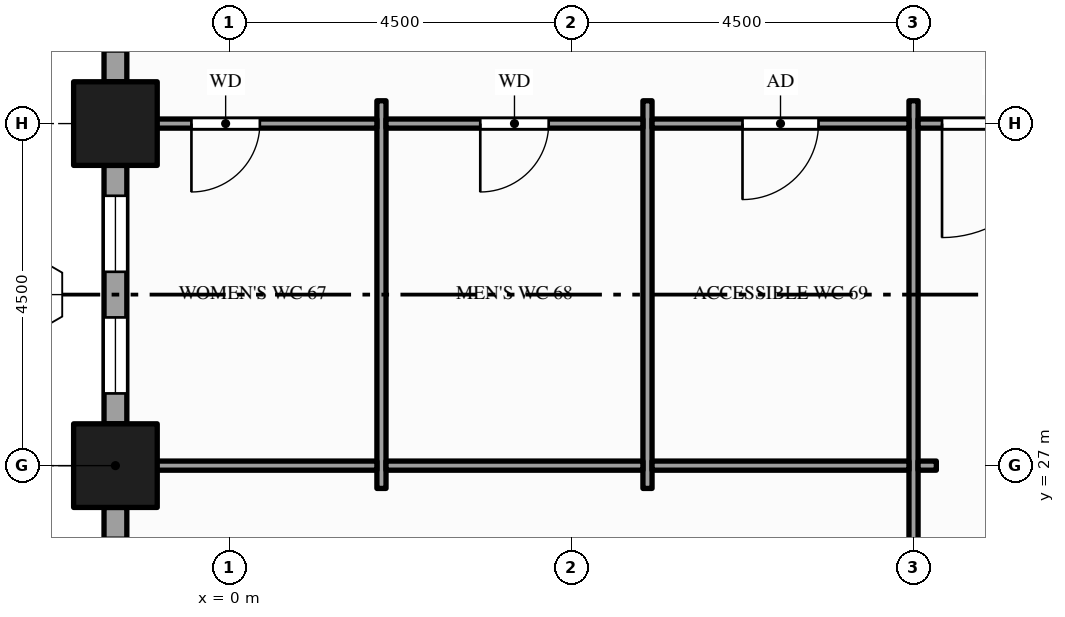
"""IFC4 building model, lengths in metres.
Left out: names, types, materials, properties, quantities, classifications, styles, units other than length and angle.
Written with IfcOpenShell. Run it as: python <this file> out.ifc"""

import sys

from ifc_helpers import new_model, si_unit, direction, frame, frame_2d, origin, origin_2d, place, context, subcontext, project, spatial, rectangle, hollow_rectangle, extrude, element, fill, save


model = new_model("IFC4")
c1 = context("Model", 3, precision=1e-05, world=origin(), true_north=direction((0.0, 1.0)))
c2 = subcontext(c1, "Body", "Model", "MODEL_VIEW")
j1 = project(units=[si_unit("LENGTHUNIT", "METRE"), si_unit("PLANEANGLEUNIT", "RADIAN")], contexts=[c1])
p1 = place(None, origin())
s1 = spatial("IfcSite", under=j1, at=p1, CompositionType="ELEMENT")
p2 = place(p1, origin())
s2 = spatial("IfcBuilding", under=s1, at=p2, CompositionType="ELEMENT")
p3 = place(p2, frame((0.0, 0.0, 73.0)))
s3 = spatial("IfcBuildingStorey", under=s2, at=p3, CompositionType="ELEMENT", Elevation=73.0)
for number, where, z_axis, x_axis in (
    (1, (-1.5, 27.0, -0.15), (0.0, 0.0, 1.0), (1.0, 0.0, 0.0)),
    (2, (-1.5, 31.5, -0.15), (0.0, 0.0, 1.0), (1.0, 0.0, 0.0)),
):
    element("IfcColumn", number, at=place(p3, frame(where, z_axis=z_axis, x_axis=x_axis)), inside=s3, PredefinedType="COLUMN", context=c2, shape_type="SweptSolid", body=[
        extrude(hollow_rectangle(XDim=1.1, YDim=1.1, WallThickness=0.06, at=origin_2d()), origin(), (0.0, 0.0, 1.0), 3.9),
    ])
p4 = place(p3, frame((-1.5, 35.45, 0.0), z_axis=(0.0, 0.0, 1.0), x_axis=(0.0, -1.0, 0.0)))
e3 = element("IfcWall", 3, at=p4, inside=s3, PredefinedType="STANDARD", context=c2, shape_type="SweptSolid", body=[
    extrude(rectangle(XDim=3.4, YDim=0.3, at=frame_2d((1.7, 0.0))), origin(), (0.0, 0.0, 1.0), 3.044),
])
p5 = place(p4, frame((0.4, 0.0, 0.9)))
e4 = element("IfcOpeningElement", 4, at=p5, cuts=e3, PredefinedType="OPENING", context=c2, shape_type="SweptSolid", body=[
    extrude(rectangle(XDim=1.0, YDim=2.0, at=frame_2d((0.5, 1.0))), frame((0.0, 0.16, 0.0), z_axis=(0.0, -1.0, 0.0), x_axis=(1.0, 0.0, 0.0)), (0.0, 0.0, 1.0), 0.32),
])
p6 = place(p4, frame((2.0, 0.0, 0.9)))
e5 = element("IfcOpeningElement", 5, at=p6, cuts=e3, PredefinedType="OPENING", context=c2, shape_type="SweptSolid", body=[
    extrude(rectangle(XDim=1.0, YDim=2.0, at=frame_2d((0.5, 1.0))), frame((0.0, 0.16, 0.0), z_axis=(0.0, -1.0, 0.0), x_axis=(1.0, 0.0, 0.0)), (0.0, 0.0, 1.0), 0.32),
])
p7 = place(p3, frame((-1.5, 30.95, 0.0), z_axis=(0.0, 0.0, 1.0), x_axis=(0.0, -1.0, 0.0)))
e6 = element("IfcWall", 6, at=p7, inside=s3, PredefinedType="STANDARD", context=c2, shape_type="SweptSolid", body=[
    extrude(rectangle(XDim=3.4, YDim=0.3, at=frame_2d((1.7, 0.0))), origin(), (0.0, 0.0, 1.0), 3.044),
])
p8 = place(p7, frame((0.4, 0.0, 0.9)))
e7 = element("IfcOpeningElement", 7, at=p8, cuts=e6, PredefinedType="OPENING", context=c2, shape_type="SweptSolid", body=[
    extrude(rectangle(XDim=1.0, YDim=2.0, at=frame_2d((0.5, 1.0))), frame((0.0, 0.16, 0.0), z_axis=(0.0, -1.0, 0.0), x_axis=(1.0, 0.0, 0.0)), (0.0, 0.0, 1.0), 0.32),
])
p9 = place(p7, frame((2.0, 0.0, 0.9)))
e8 = element("IfcOpeningElement", 8, at=p9, cuts=e6, PredefinedType="OPENING", context=c2, shape_type="SweptSolid", body=[
    extrude(rectangle(XDim=1.0, YDim=2.0, at=frame_2d((0.5, 1.0))), frame((0.0, 0.16, 0.0), z_axis=(0.0, -1.0, 0.0), x_axis=(1.0, 0.0, 0.0)), (0.0, 0.0, 1.0), 0.32),
])
p10 = place(p3, frame((-1.5, 26.45, 0.0), z_axis=(0.0, 0.0, 1.0), x_axis=(0.0, -1.0, 0.0)))
e9 = element("IfcWall", 9, at=p10, inside=s3, PredefinedType="STANDARD", context=c2, shape_type="SweptSolid", body=[
    extrude(rectangle(XDim=3.4, YDim=0.3, at=frame_2d((1.7, 0.0))), origin(), (0.0, 0.0, 1.0), 3.044),
])
p11 = place(p10, frame((0.4, 0.0, 0.9)))
e10 = element("IfcOpeningElement", 10, at=p11, cuts=e9, PredefinedType="OPENING", context=c2, shape_type="SweptSolid", body=[
    extrude(rectangle(XDim=1.0, YDim=2.0, at=frame_2d((0.5, 1.0))), frame((0.0, 0.16, 0.0), z_axis=(0.0, -1.0, 0.0), x_axis=(1.0, 0.0, 0.0)), (0.0, 0.0, 1.0), 0.32),
])
p12 = place(p10, frame((2.0, 0.0, 0.9)))
e11 = element("IfcOpeningElement", 11, at=p12, cuts=e9, PredefinedType="OPENING", context=c2, shape_type="SweptSolid", body=[
    extrude(rectangle(XDim=1.0, YDim=2.0, at=frame_2d((0.5, 1.0))), frame((0.0, 0.16, 0.0), z_axis=(0.0, -1.0, 0.0), x_axis=(1.0, 0.0, 0.0)), (0.0, 0.0, 1.0), 0.32),
])
for number, where, z_axis, x_axis in (
    (12, (2.0, 26.7, 0.0), (0.0, 0.0, 1.0), (0.0, 1.0, 0.0)),
    (13, (5.5, 26.7, 0.0), (0.0, 0.0, 1.0), (0.0, 1.0, 0.0)),
):
    element("IfcWall", number, at=place(p3, frame(where, z_axis=z_axis, x_axis=x_axis)), inside=s3, PredefinedType="PARTITIONING", context=c2, shape_type="SweptSolid", body=[
        extrude(rectangle(XDim=5.1, YDim=0.12, at=frame_2d((2.55, 0.0))), origin(), (0.0, 0.0, 1.0), 3.75),
    ])
p13 = place(p3, frame((9.0, 10.95, 0.0), z_axis=(0.0, 0.0, 1.0), x_axis=(0.0, 1.0, 0.0)))
e14 = element("IfcWall", 14, at=p13, inside=s3, PredefinedType="PARTITIONING", context=c2, shape_type="SweptSolid", body=[
    extrude(rectangle(XDim=20.85, YDim=0.12, at=frame_2d((10.425, 0.0))), origin(), (0.0, 0.0, 1.0), 2.5),
])
p14 = place(p13, frame((3.9, 0.0, 0.0)))
e15 = element("IfcOpeningElement", 15, at=p14, cuts=e14, PredefinedType="OPENING", context=c2, shape_type="SweptSolid", body=[
    extrude(rectangle(XDim=1.8, YDim=2.1, at=frame_2d((0.9, 1.05))), frame((0.0, 0.07, 0.0), z_axis=(0.0, -1.0, 0.0), x_axis=(1.0, 0.0, 0.0)), (0.0, 0.0, 1.0), 0.14),
])
p15 = place(p13, frame((12.205, 0.0, 0.0)))
e16 = element("IfcOpeningElement", 16, at=p15, cuts=e14, PredefinedType="OPENING", context=c2, shape_type="SweptSolid", body=[
    extrude(rectangle(XDim=1.0, YDim=2.1, at=frame_2d((0.5, 1.05))), frame((0.0, 0.07, 0.0), z_axis=(0.0, -1.0, 0.0), x_axis=(1.0, 0.0, 0.0)), (0.0, 0.0, 1.0), 0.14),
])
p16 = place(p3, frame((-1.35, 27.0, 0.0), z_axis=(0.0, 0.0, 1.0), x_axis=(1.0, 0.0, 0.0)))
e17 = element("IfcWall", 17, at=p16, inside=s3, PredefinedType="PARTITIONING", context=c2, shape_type="SweptSolid", body=[
    extrude(rectangle(XDim=3.29, YDim=0.12, at=frame_2d((1.645, 0.0))), origin(), (0.0, 0.0, 1.0), 2.35),
])
for number, where, z_axis, x_axis in (
    (18, (2.06, 27.0, 0.0), (0.0, 0.0, 1.0), (1.0, 0.0, 0.0)),
    (19, (5.56, 27.0, 0.0), (0.0, 0.0, 1.0), (1.0, 0.0, 0.0)),
):
    element("IfcWall", number, at=place(p3, frame(where, z_axis=z_axis, x_axis=x_axis)), inside=s3, PredefinedType="PARTITIONING", context=c2, shape_type="SweptSolid", body=[
        extrude(rectangle(XDim=3.38, YDim=0.12, at=frame_2d((1.69, 0.0))), origin(), (0.0, 0.0, 1.0), 2.838),
    ])
p17 = place(p3, frame((9.06, 27.0, 0.0), z_axis=(0.0, 0.0, 1.0), x_axis=(1.0, 0.0, 0.0)))
e20 = element("IfcWall", 20, at=p17, inside=s3, PredefinedType="PARTITIONING", context=c2, shape_type="SweptSolid", body=[
    extrude(rectangle(XDim=0.24, YDim=0.12, at=frame_2d((0.12, 0.0))), origin(), (0.0, 0.0, 1.0), 2.838),
])
p18 = place(p3, frame((-1.35, 31.5, 0.0), z_axis=(0.0, 0.0, 1.0), x_axis=(1.0, 0.0, 0.0)))
e21 = element("IfcWall", 21, at=p18, inside=s3, PredefinedType="PARTITIONING", context=c2, shape_type="SweptSolid", body=[
    extrude(rectangle(XDim=3.29, YDim=0.12, at=frame_2d((1.645, 0.0))), origin(), (0.0, 0.0, 1.0), 2.35),
])
p19 = place(p18, frame((0.85, 0.0, 0.0)))
e22 = element("IfcOpeningElement", 22, at=p19, cuts=e21, PredefinedType="OPENING", context=c2, shape_type="SweptSolid", body=[
    extrude(rectangle(XDim=0.9, YDim=2.1, at=frame_2d((0.45, 1.05))), frame((0.0, 0.07, 0.0), z_axis=(0.0, -1.0, 0.0), x_axis=(1.0, 0.0, 0.0)), (0.0, 0.0, 1.0), 0.14),
])
p20 = place(p3, frame((2.06, 31.5, 0.0), z_axis=(0.0, 0.0, 1.0), x_axis=(1.0, 0.0, 0.0)))
e23 = element("IfcWall", 23, at=p20, inside=s3, PredefinedType="PARTITIONING", context=c2, shape_type="SweptSolid", body=[
    extrude(rectangle(XDim=3.38, YDim=0.12, at=frame_2d((1.69, 0.0))), origin(), (0.0, 0.0, 1.0), 2.838),
])
p21 = place(p20, frame((1.24, 0.0, 0.0)))
e24 = element("IfcOpeningElement", 24, at=p21, cuts=e23, PredefinedType="OPENING", context=c2, shape_type="SweptSolid", body=[
    extrude(rectangle(XDim=0.9, YDim=2.1, at=frame_2d((0.45, 1.05))), frame((0.0, 0.07, 0.0), z_axis=(0.0, -1.0, 0.0), x_axis=(1.0, 0.0, 0.0)), (0.0, 0.0, 1.0), 0.14),
])
p22 = place(p3, frame((5.56, 31.5, 0.0), z_axis=(0.0, 0.0, 1.0), x_axis=(1.0, 0.0, 0.0)))
e25 = element("IfcWall", 25, at=p22, inside=s3, PredefinedType="PARTITIONING", context=c2, shape_type="SweptSolid", body=[
    extrude(rectangle(XDim=3.38, YDim=0.12, at=frame_2d((1.69, 0.0))), origin(), (0.0, 0.0, 1.0), 2.838),
])
p23 = place(p22, frame((1.19, 0.0, 0.0)))
e26 = element("IfcOpeningElement", 26, at=p23, cuts=e25, PredefinedType="OPENING", context=c2, shape_type="SweptSolid", body=[
    extrude(rectangle(XDim=1.0, YDim=2.1, at=frame_2d((0.5, 1.05))), frame((0.0, 0.07, 0.0), z_axis=(0.0, -1.0, 0.0), x_axis=(1.0, 0.0, 0.0)), (0.0, 0.0, 1.0), 0.14),
])
p24 = place(p3, frame((9.06, 31.5, 0.0), z_axis=(0.0, 0.0, 1.0), x_axis=(1.0, 0.0, 0.0)))
e27 = element("IfcWall", 27, at=p24, inside=s3, PredefinedType="PARTITIONING", context=c2, shape_type="SweptSolid", body=[
    extrude(rectangle(XDim=2.13, YDim=0.12, at=frame_2d((1.065, 0.0))), origin(), (0.0, 0.0, 1.0), 2.838),
])
p25 = place(p24, frame((0.315, 0.0, 0.0)))
e28 = element("IfcOpeningElement", 28, at=p25, cuts=e27, PredefinedType="OPENING", context=c2, shape_type="SweptSolid", body=[
    extrude(rectangle(XDim=1.5, YDim=2.1, at=frame_2d((0.75, 1.05))), frame((0.0, 0.07, 0.0), z_axis=(0.0, -1.0, 0.0), x_axis=(1.0, 0.0, 0.0)), (0.0, 0.0, 1.0), 0.14),
])
p26 = place(p8, origin())
e29 = element("IfcWindow", 29, at=p26, inside=s3, PartitioningType="SINGLE_PANEL", PredefinedType="WINDOW", context=c2, shape_type="SweptSolid", body=[
    extrude(rectangle(XDim=1.0, YDim=2.0, at=frame_2d((0.5, 1.0))), frame((0.0, 0.03, 0.0), z_axis=(0.0, -1.0, 0.0), x_axis=(1.0, 0.0, 0.0)), (0.0, 0.0, 1.0), 0.06),
])
fill(e7, e29)
p27 = place(p9, origin())
e30 = element("IfcWindow", 30, at=p27, inside=s3, PartitioningType="SINGLE_PANEL", PredefinedType="WINDOW", context=c2, shape_type="SweptSolid", body=[
    extrude(rectangle(XDim=1.0, YDim=2.0, at=frame_2d((0.5, 1.0))), frame((0.0, 0.03, 0.0), z_axis=(0.0, -1.0, 0.0), x_axis=(1.0, 0.0, 0.0)), (0.0, 0.0, 1.0), 0.06),
])
fill(e8, e30)
p28 = place(p25, origin())
e31 = element("IfcDoor", 31, at=p28, inside=s3, OperationType="SINGLE_SWING_LEFT", PredefinedType="DOOR", context=c2, shape_type="SweptSolid", body=[
    extrude(rectangle(XDim=1.5, YDim=2.1, at=frame_2d((0.75, 1.05))), frame((0.0, 0.025, 0.0), z_axis=(0.0, -1.0, 0.0), x_axis=(1.0, 0.0, 0.0)), (0.0, 0.0, 1.0), 0.05),
])
fill(e28, e31)
p29 = place(p19, origin())
e32 = element("IfcDoor", 32, at=p29, inside=s3, OperationType="SINGLE_SWING_LEFT", PredefinedType="DOOR", context=c2, shape_type="SweptSolid", body=[
    extrude(rectangle(XDim=0.9, YDim=2.1, at=frame_2d((0.45, 1.05))), frame((0.0, 0.025, 0.0), z_axis=(0.0, -1.0, 0.0), x_axis=(1.0, 0.0, 0.0)), (0.0, 0.0, 1.0), 0.05),
])
fill(e22, e32)
p30 = place(p21, origin())
e33 = element("IfcDoor", 33, at=p30, inside=s3, OperationType="SINGLE_SWING_LEFT", PredefinedType="DOOR", context=c2, shape_type="SweptSolid", body=[
    extrude(rectangle(XDim=0.9, YDim=2.1, at=frame_2d((0.45, 1.05))), frame((0.0, 0.025, 0.0), z_axis=(0.0, -1.0, 0.0), x_axis=(1.0, 0.0, 0.0)), (0.0, 0.0, 1.0), 0.05),
])
fill(e24, e33)
p31 = place(p23, origin())
e34 = element("IfcDoor", 34, at=p31, inside=s3, OperationType="SINGLE_SWING_LEFT", PredefinedType="DOOR", context=c2, shape_type="SweptSolid", body=[
    extrude(rectangle(XDim=1.0, YDim=2.1, at=frame_2d((0.5, 1.05))), frame((0.0, 0.025, 0.0), z_axis=(0.0, -1.0, 0.0), x_axis=(1.0, 0.0, 0.0)), (0.0, 0.0, 1.0), 0.05),
])
fill(e26, e34)
save(model, sys.argv[1])
